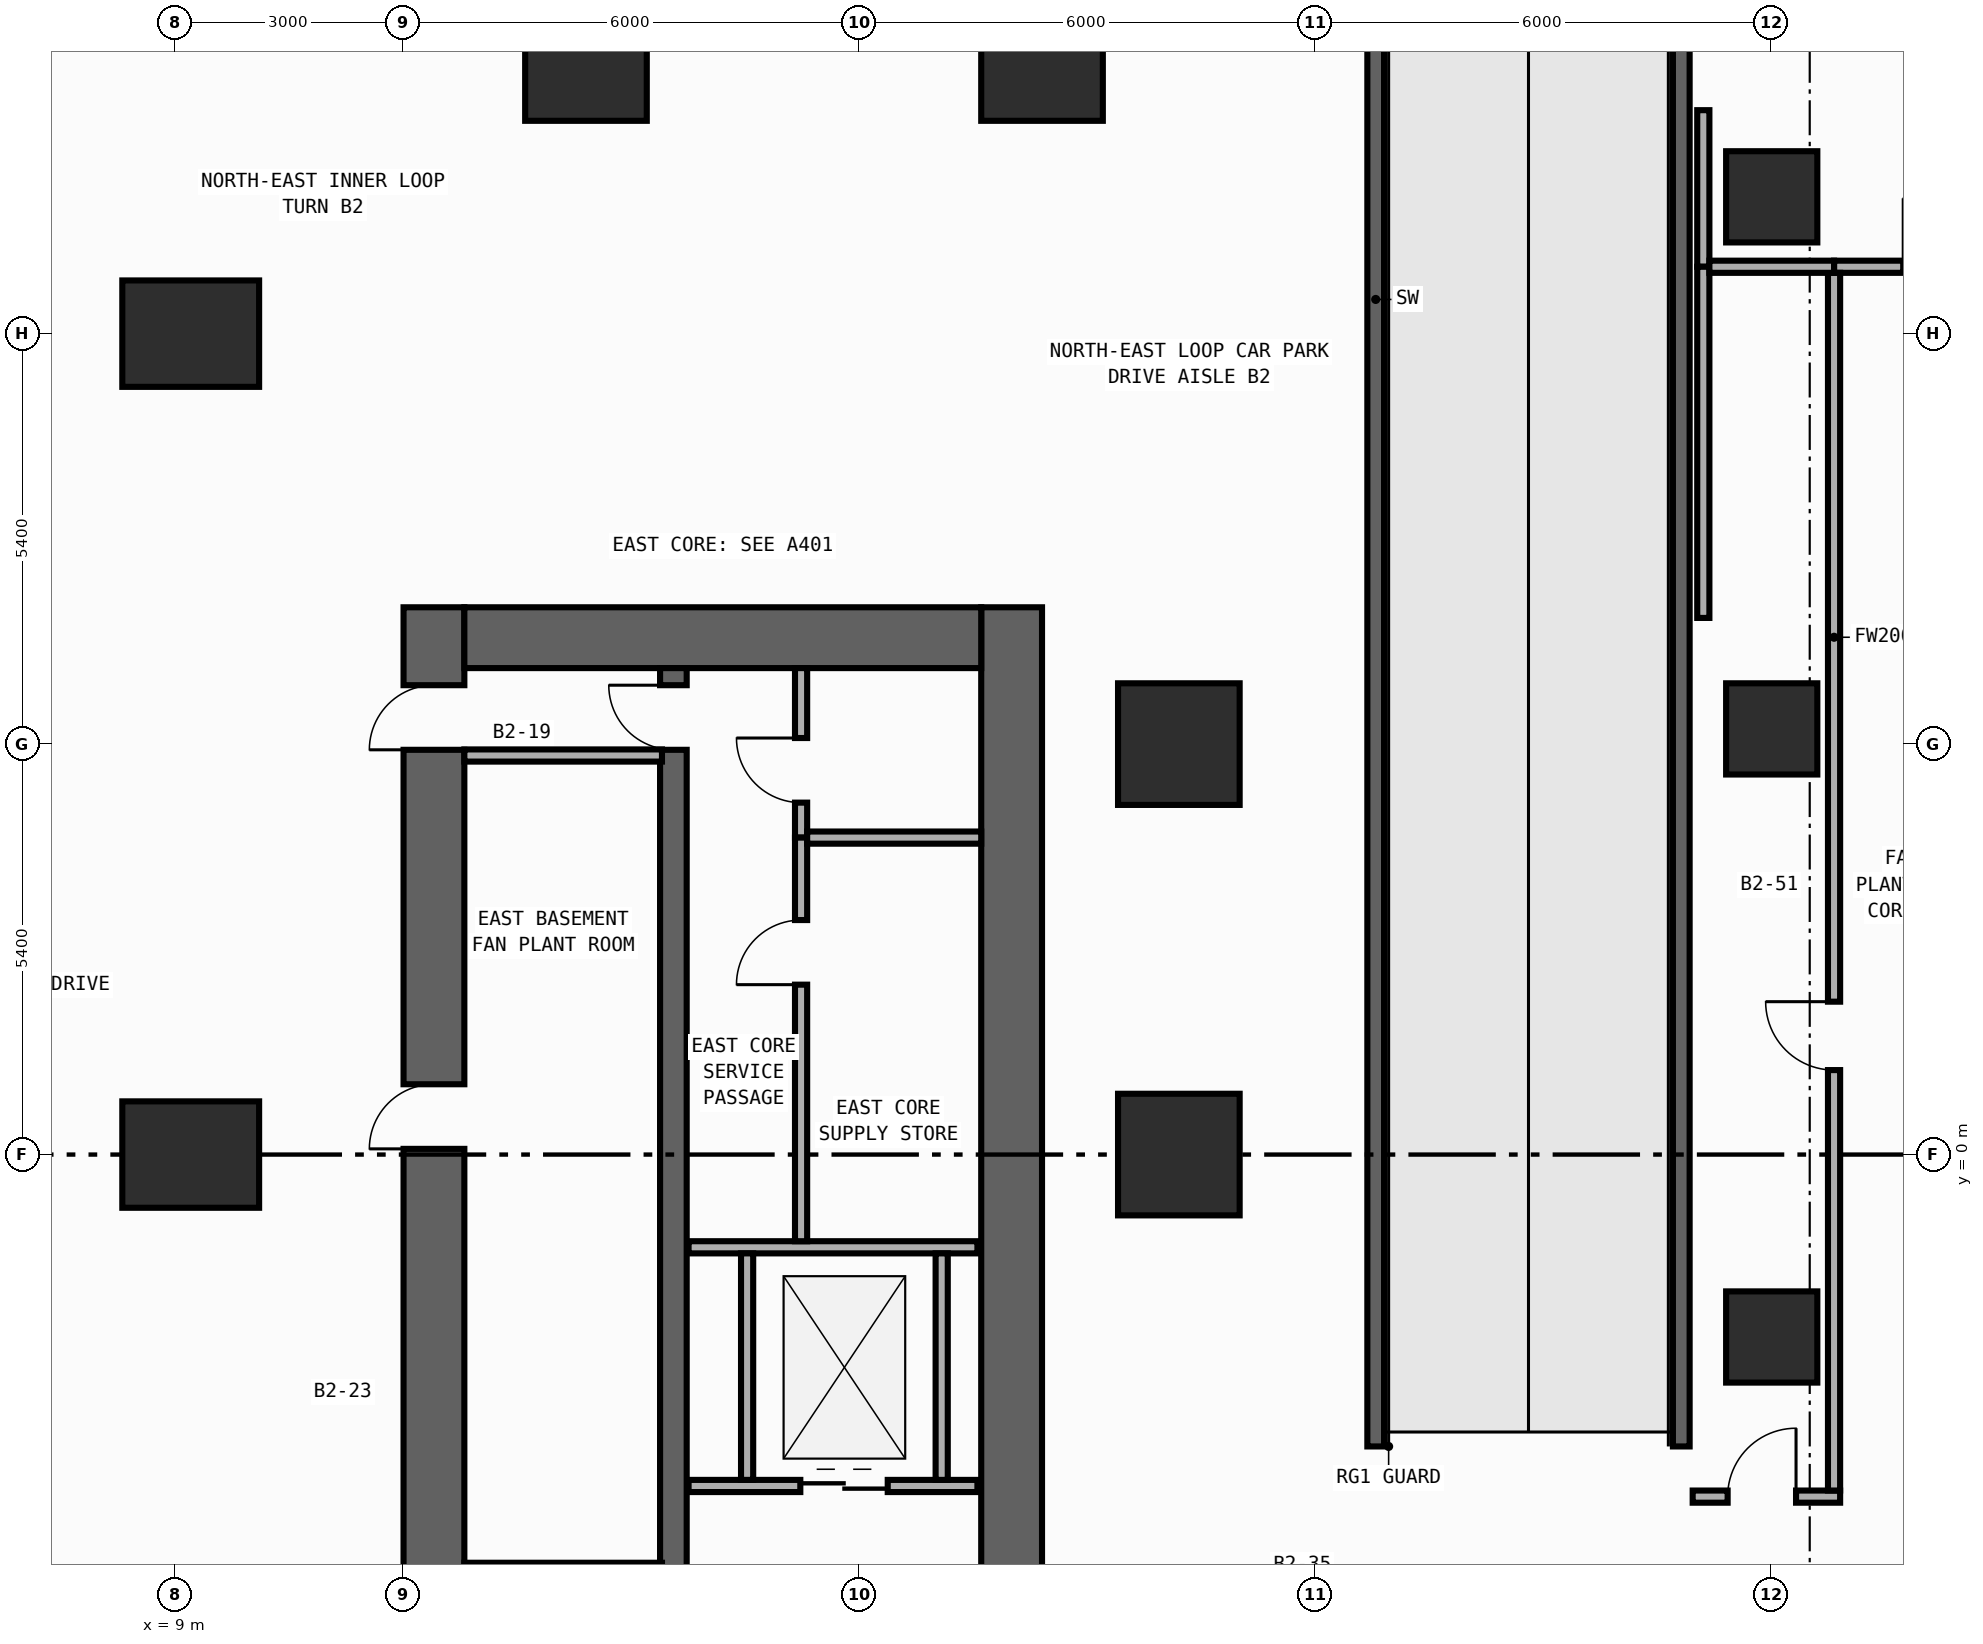
"""IFC4 building model, lengths in metres.
Left out: names, types, materials, properties, quantities, classifications, styles, units other than length and angle.
Written with IfcOpenShell. Run it as: python <this file> out.ifc"""

import sys

from ifc_helpers import new_model, si_unit, direction, frame, frame_2d, origin, origin_2d, place, context, subcontext, project, spatial, polyline, rectangle, outline, extrude, element, fill, save


model = new_model("IFC4")
c1 = context("Model", 3, precision=1e-05, world=origin(), true_north=direction((0.0, 1.0)))
c2 = subcontext(c1, "Body", "Model", "MODEL_VIEW")
j1 = project(units=[si_unit("LENGTHUNIT", "METRE"), si_unit("PLANEANGLEUNIT", "RADIAN")], contexts=[c1])
p1 = place(None, origin())
s1 = spatial("IfcSite", under=j1, at=p1, CompositionType="ELEMENT")
p2 = place(p1, origin())
s2 = spatial("IfcBuilding", under=s1, at=p2, CompositionType="ELEMENT")
p3 = place(p2, frame((0.0, 0.0, -9.0)))
s3 = spatial("IfcBuildingStorey", under=s2, at=p3, CompositionType="ELEMENT", Elevation=-9.0)
p4 = place(p3, frame((12.4, -19.8, 0.0), z_axis=(0.0, 0.0, 1.0), x_axis=(0.0, 1.0, 0.0)))
e1 = element("IfcWall", 1, at=p4, inside=s3, PredefinedType="SHEAR", context=c2, shape_type="SweptSolid", body=[
    extrude(rectangle(XDim=27.0, YDim=0.8, at=frame_2d((13.5, 0.0))), origin(), (0.0, 0.0, 1.0), 4.2),
])
p5 = place(p4, frame((19.875, 0.0, 0.0)))
e2 = element("IfcOpeningElement", 2, at=p5, cuts=e1, PredefinedType="OPENING", context=c2, shape_type="SweptSolid", body=[
    extrude(rectangle(XDim=0.85, YDim=2.1, at=frame_2d((0.425, 1.05))), frame((0.0, 0.41, 0.0), z_axis=(0.0, -1.0, 0.0), x_axis=(1.0, 0.0, 0.0)), (0.0, 0.0, 1.0), 0.82),
])
p6 = place(p4, frame((10.175, 0.0, 0.0)))
e3 = element("IfcOpeningElement", 3, at=p6, cuts=e1, PredefinedType="OPENING", context=c2, shape_type="SweptSolid", body=[
    extrude(rectangle(XDim=0.85, YDim=2.1, at=frame_2d((0.425, 1.05))), frame((0.0, 0.41, 0.0), z_axis=(0.0, -1.0, 0.0), x_axis=(1.0, 0.0, 0.0)), (0.0, 0.0, 1.0), 0.82),
])
p7 = place(p4, frame((12.725, 0.0, 0.0)))
e4 = element("IfcOpeningElement", 4, at=p7, cuts=e1, PredefinedType="OPENING", context=c2, shape_type="SweptSolid", body=[
    extrude(rectangle(XDim=1.15, YDim=2.2, at=frame_2d((0.575, 1.1))), frame((0.0, 0.41, 0.0), z_axis=(0.0, -1.0, 0.0), x_axis=(1.0, 0.0, 0.0)), (0.0, 0.0, 1.0), 0.82),
])
p8 = place(p4, frame((25.125, 0.0, 0.0)))
e5 = element("IfcOpeningElement", 5, at=p8, cuts=e1, PredefinedType="OPENING", context=c2, shape_type="SweptSolid", body=[
    extrude(rectangle(XDim=0.85, YDim=2.1, at=frame_2d((0.425, 1.05))), frame((0.0, 0.41, 0.0), z_axis=(0.0, -1.0, 0.0), x_axis=(1.0, 0.0, 0.0)), (0.0, 0.0, 1.0), 0.82),
])
p9 = place(p3, frame((20.0, -19.8, 0.0), z_axis=(0.0, 0.0, 1.0), x_axis=(0.0, 1.0, 0.0)))
e6 = element("IfcWall", 6, at=p9, inside=s3, PredefinedType="SHEAR", context=c2, shape_type="SweptSolid", body=[
    extrude(rectangle(XDim=27.0, YDim=0.8, at=frame_2d((13.5, 0.0))), origin(), (0.0, 0.0, 1.0), 4.2),
])
p10 = place(p3, frame((12.8, 6.8, 0.0), z_axis=(0.0, 0.0, 1.0), x_axis=(1.0, 0.0, 0.0)))
e7 = element("IfcWall", 7, at=p10, inside=s3, PredefinedType="SHEAR", context=c2, shape_type="SweptSolid", body=[
    extrude(rectangle(XDim=6.8, YDim=0.8, at=frame_2d((3.4, 0.0))), origin(), (0.0, 0.0, 1.0), 4.2),
])
p11 = place(p3, frame((15.55, -19.0, 0.0), z_axis=(0.0, 0.0, 1.0), x_axis=(0.0, 1.0, 0.0)))
e8 = element("IfcWall", 8, at=p11, inside=s3, PredefinedType="SHEAR", context=c2, shape_type="SweptSolid", body=[
    extrude(rectangle(XDim=25.4, YDim=0.35, at=frame_2d((12.7, 0.0))), origin(), (0.0, 0.0, 1.0), 4.2),
])
p12 = place(p11, frame((11.925, 0.0, 0.0)))
e9 = element("IfcOpeningElement", 9, at=p12, cuts=e8, PredefinedType="OPENING", context=c2, shape_type="SweptSolid", body=[
    extrude(rectangle(XDim=1.15, YDim=2.2, at=frame_2d((0.575, 1.1))), frame((0.0, 0.185, 0.0), z_axis=(0.0, -1.0, 0.0), x_axis=(1.0, 0.0, 0.0)), (0.0, 0.0, 1.0), 0.37),
])
p13 = place(p11, frame((24.325, 0.0, 0.0)))
e10 = element("IfcOpeningElement", 10, at=p13, cuts=e8, PredefinedType="OPENING", context=c2, shape_type="SweptSolid", body=[
    extrude(rectangle(XDim=0.85, YDim=2.1, at=frame_2d((0.425, 1.05))), frame((0.0, 0.185, 0.0), z_axis=(0.0, -1.0, 0.0), x_axis=(1.0, 0.0, 0.0)), (0.0, 0.0, 1.0), 0.37),
])
for number, where, z_axis, x_axis in (
    (11, (9.2, 0.0, 0.0), (0.0, 0.0, 1.0), (1.0, 0.0, 0.0)),
    (12, (9.2, 10.8, 0.0), (0.0, 0.0, 1.0), (1.0, 0.0, 0.0)),
):
    element("IfcColumn", number, at=place(p3, frame(where, z_axis=z_axis, x_axis=x_axis)), inside=s3, PredefinedType="COLUMN", context=c2, shape_type="SweptSolid", body=[
        extrude(rectangle(XDim=1.8, YDim=1.4, at=origin_2d()), origin(), (0.0, 0.0, 1.0), 4.5),
    ])
for number, where, z_axis, x_axis in (
    (13, (20.4, 14.4, 0.0), (0.0, 0.0, 1.0), (1.0, 0.0, 0.0)),
    (14, (14.4, 14.4, 0.0), (0.0, 0.0, 1.0), (1.0, 0.0, 0.0)),
):
    element("IfcColumn", number, at=place(p3, frame(where, z_axis=z_axis, x_axis=x_axis)), inside=s3, PredefinedType="COLUMN", context=c2, shape_type="SweptSolid", body=[
        extrude(rectangle(XDim=1.6, YDim=1.6, at=origin_2d()), origin(), (0.0, 0.0, 1.0), 4.5),
    ])
for number, where, z_axis, x_axis in (
    (15, (30.0, -2.4, 0.0), (0.0, 0.0, 1.0), (1.0, 0.0, 0.0)),
    (16, (30.0, 5.6, 0.0), (0.0, 0.0, 1.0), (1.0, 0.0, 0.0)),
    (17, (30.0, 12.6, 0.0), (0.0, 0.0, 1.0), (1.0, 0.0, 0.0)),
):
    element("IfcColumn", number, at=place(p3, frame(where, z_axis=z_axis, x_axis=x_axis)), inside=s3, PredefinedType="COLUMN", context=c2, shape_type="SweptSolid", body=[
        extrude(rectangle(XDim=1.2, YDim=1.2, at=origin_2d()), origin(), (0.0, 0.0, 1.0), 4.5),
    ])
for number, where, z_axis, x_axis in (
    (18, (22.2, 0.0, 0.0), (0.0, 0.0, 1.0), (1.0, 0.0, 0.0)),
    (19, (22.2, 5.4, 0.0), (0.0, 0.0, 1.0), (1.0, 0.0, 0.0)),
):
    element("IfcColumn", number, at=place(p3, frame(where, z_axis=z_axis, x_axis=x_axis)), inside=s3, PredefinedType="COLUMN", context=c2, shape_type="SweptSolid", body=[
        extrude(rectangle(XDim=1.6, YDim=1.6, at=origin_2d()), origin(), (0.0, 0.0, 1.0), 4.5),
    ])
for number, where, z_axis, x_axis in (
    (20, (24.79, -3.84, 0.0), (0.0, 0.0, 1.0), (0.0, 1.0, 0.0)),
    (21, (28.81, -3.84, 0.0), (0.0, 0.0, 1.0), (0.0, 1.0, 0.0)),
):
    element("IfcWall", number, at=place(p3, frame(where, z_axis=z_axis, x_axis=x_axis)), inside=s3, PredefinedType="SHEAR", context=c2, shape_type="SweptSolid", body=[
        extrude(outline(polyline([(0.0, 0.0), (30.18, 0.0), (30.18, 4.2), (0.0, 0.02), (0.0, 0.0)])), frame((0.0, 0.11, 0.0), z_axis=(0.0, -1.0, 0.0), x_axis=(1.0, 0.0, 0.0)), (0.0, 0.0, 1.0), 0.22),
    ])
p14 = place(p3, frame((15.75, -4.36, 0.0), z_axis=(0.0, 0.0, 1.0), x_axis=(1.0, 0.0, 0.0)))
e22 = element("IfcWall", 22, at=p14, inside=s3, PredefinedType="STANDARD", context=c2, shape_type="SweptSolid", body=[
    extrude(rectangle(XDim=3.8, YDim=0.16, at=frame_2d((1.9, 0.0))), origin(), (0.0, 0.0, 1.0), 4.2),
])
p15 = place(p14, frame((1.47, 0.0, 0.0)))
e23 = element("IfcOpeningElement", 23, at=p15, cuts=e22, PredefinedType="OPENING", context=c2, shape_type="SweptSolid", body=[
    extrude(rectangle(XDim=1.15, YDim=2.2, at=frame_2d((0.575, 1.1))), frame((0.0, 0.09, 0.0), z_axis=(0.0, -1.0, 0.0), x_axis=(1.0, 0.0, 0.0)), (0.0, 0.0, 1.0), 0.18),
])
p16 = place(p3, frame((15.75, -1.22, 0.0), z_axis=(0.0, 0.0, 1.0), x_axis=(1.0, 0.0, 0.0)))
e24 = element("IfcWall", 24, at=p16, inside=s3, PredefinedType="STANDARD", context=c2, shape_type="SweptSolid", body=[
    extrude(rectangle(XDim=3.8, YDim=0.16, at=frame_2d((1.9, 0.0))), origin(), (0.0, 0.0, 1.0), 4.2),
])
for number, where, z_axis, x_axis in (
    (25, (16.52, -4.28, 0.0), (0.0, 0.0, 1.0), (0.0, 1.0, 0.0)),
    (26, (19.08, -4.28, 0.0), (0.0, 0.0, 1.0), (0.0, 1.0, 0.0)),
):
    element("IfcWall", number, at=place(p3, frame(where, z_axis=z_axis, x_axis=x_axis)), inside=s3, PredefinedType="STANDARD", context=c2, shape_type="SweptSolid", body=[
        extrude(rectangle(XDim=2.98, YDim=0.16, at=frame_2d((1.49, 0.0))), origin(), (0.0, 0.0, 1.0), 4.2),
    ])
for number, where, z_axis, x_axis in (
    (27, (12.8, -5.45, 0.0), (0.0, 0.0, 1.0), (1.0, 0.0, 0.0)),
    (28, (12.8, 5.25, 0.0), (0.0, 0.0, 1.0), (1.0, 0.0, 0.0)),
):
    element("IfcWall", number, at=place(p3, frame(where, z_axis=z_axis, x_axis=x_axis)), inside=s3, PredefinedType="STANDARD", context=c2, shape_type="SweptSolid", body=[
        extrude(rectangle(XDim=2.6, YDim=0.16, at=frame_2d((1.3, 0.0))), origin(), (0.0, 0.0, 1.0), 4.2),
    ])
p17 = place(p3, frame((17.23, 4.17, 0.0), z_axis=(0.0, 0.0, 1.0), x_axis=(0.0, 1.0, 0.0)))
e29 = element("IfcWall", 29, at=p17, inside=s3, PredefinedType="PARTITIONING", context=c2, shape_type="SweptSolid", body=[
    extrude(rectangle(XDim=2.23, YDim=0.16, at=frame_2d((1.115, 0.0))), origin(), (0.0, 0.0, 1.0), 4.2),
])
p18 = place(p17, frame((0.46, 0.0, 0.0)))
e30 = element("IfcOpeningElement", 30, at=p18, cuts=e29, PredefinedType="OPENING", context=c2, shape_type="SweptSolid", body=[
    extrude(rectangle(XDim=0.85, YDim=2.1, at=frame_2d((0.425, 1.05))), frame((0.0, 0.09, 0.0), z_axis=(0.0, -1.0, 0.0), x_axis=(1.0, 0.0, 0.0)), (0.0, 0.0, 1.0), 0.18),
])
p19 = place(p3, frame((17.23, -1.14, 0.0), z_axis=(0.0, 0.0, 1.0), x_axis=(0.0, 1.0, 0.0)))
e31 = element("IfcWall", 31, at=p19, inside=s3, PredefinedType="PARTITIONING", context=c2, shape_type="SweptSolid", body=[
    extrude(rectangle(XDim=5.31, YDim=0.16, at=frame_2d((2.655, 0.0))), origin(), (0.0, 0.0, 1.0), 4.2),
])
p20 = place(p19, frame((3.375, 0.0, 0.0)))
e32 = element("IfcOpeningElement", 32, at=p20, cuts=e31, PredefinedType="OPENING", context=c2, shape_type="SweptSolid", body=[
    extrude(rectangle(XDim=0.85, YDim=2.1, at=frame_2d((0.425, 1.05))), frame((0.0, 0.09, 0.0), z_axis=(0.0, -1.0, 0.0), x_axis=(1.0, 0.0, 0.0)), (0.0, 0.0, 1.0), 0.18),
])
p21 = place(p3, frame((17.31, 4.17, 0.0), z_axis=(0.0, 0.0, 1.0), x_axis=(1.0, 0.0, 0.0)))
e33 = element("IfcWall", 33, at=p21, inside=s3, PredefinedType="PARTITIONING", context=c2, shape_type="SweptSolid", body=[
    extrude(rectangle(XDim=2.29, YDim=0.16, at=frame_2d((1.145, 0.0))), origin(), (0.0, 0.0, 1.0), 4.2),
])
p22 = place(p3, frame((29.1, 11.68, 0.0), z_axis=(0.0, 0.0, 1.0), x_axis=(0.0, 1.0, 0.0)))
e34 = element("IfcWall", 34, at=p22, inside=s3, PredefinedType="PARTITIONING", context=c2, shape_type="SweptSolid", body=[
    extrude(rectangle(XDim=2.06, YDim=0.16, at=frame_2d((1.03, 0.0))), origin(), (0.0, 0.0, 1.0), 4.2),
])
p23 = place(p3, frame((29.1, 7.06, 0.0), z_axis=(0.0, 0.0, 1.0), x_axis=(0.0, 1.0, 0.0)))
e35 = element("IfcWall", 35, at=p23, inside=s3, PredefinedType="PARTITIONING", context=c2, shape_type="SweptSolid", body=[
    extrude(rectangle(XDim=4.62, YDim=0.16, at=frame_2d((2.31, 0.0))), origin(), (0.0, 0.0, 1.0), 4.2),
])
p24 = place(p3, frame((28.96, -4.5, 0.0), z_axis=(0.0, 0.0, 1.0), x_axis=(1.0, 0.0, 0.0)))
e36 = element("IfcWall", 36, at=p24, inside=s3, PredefinedType="PARTITIONING", context=c2, shape_type="SweptSolid", body=[
    extrude(rectangle(XDim=1.94, YDim=0.16, at=frame_2d((0.97, 0.0))), origin(), (0.0, 0.0, 1.0), 4.2),
])
p25 = place(p24, frame((0.46, 0.0, 0.0)))
e37 = element("IfcOpeningElement", 37, at=p25, cuts=e36, PredefinedType="OPENING", context=c2, shape_type="SweptSolid", body=[
    extrude(rectangle(XDim=0.9, YDim=2.15, at=frame_2d((0.45, 1.075))), frame((0.0, 0.09, 0.0), z_axis=(0.0, -1.0, 0.0), x_axis=(1.0, 0.0, 0.0)), (0.0, 0.0, 1.0), 0.18),
])
p26 = place(p3, frame((30.82, 11.68, 0.0), z_axis=(0.0, 0.0, 1.0), x_axis=(1.0, 0.0, 0.0)))
e38 = element("IfcWall", 38, at=p26, inside=s3, PredefinedType="PARTITIONING", context=c2, shape_type="SweptSolid", body=[
    extrude(rectangle(XDim=2.72, YDim=0.16, at=frame_2d((1.36, 0.0))), origin(), (0.0, 0.0, 1.0), 4.2),
])
p27 = place(p26, frame((0.91, 0.0, 0.0)))
e39 = element("IfcOpeningElement", 39, at=p27, cuts=e38, PredefinedType="OPENING", context=c2, shape_type="SweptSolid", body=[
    extrude(rectangle(XDim=0.9, YDim=2.15, at=frame_2d((0.45, 1.075))), frame((0.0, 0.09, 0.0), z_axis=(0.0, -1.0, 0.0), x_axis=(1.0, 0.0, 0.0)), (0.0, 0.0, 1.0), 0.18),
])
p28 = place(p3, frame((30.82, -4.42, 0.0), z_axis=(0.0, 0.0, 1.0), x_axis=(0.0, 1.0, 0.0)))
e40 = element("IfcWall", 40, at=p28, inside=s3, PredefinedType="PARTITIONING", context=c2, shape_type="SweptSolid", body=[
    extrude(rectangle(XDim=16.02, YDim=0.16, at=frame_2d((8.01, 0.0))), origin(), (0.0, 0.0, 1.0), 4.2),
])
p29 = place(p28, frame((5.531, 0.0, 0.0)))
e41 = element("IfcOpeningElement", 41, at=p29, cuts=e40, PredefinedType="OPENING", context=c2, shape_type="SweptSolid", body=[
    extrude(rectangle(XDim=0.9, YDim=2.15, at=frame_2d((0.45, 1.075))), frame((0.0, 0.09, 0.0), z_axis=(0.0, -1.0, 0.0), x_axis=(1.0, 0.0, 0.0)), (0.0, 0.0, 1.0), 0.18),
])
p30 = place(p3, frame((29.18, 11.68, 0.0), z_axis=(0.0, 0.0, 1.0), x_axis=(1.0, 0.0, 0.0)))
e42 = element("IfcWall", 42, at=p30, inside=s3, PredefinedType="PARTITIONING", context=c2, shape_type="SweptSolid", body=[
    extrude(rectangle(XDim=1.64, YDim=0.16, at=frame_2d((0.82, 0.0))), origin(), (0.0, 0.0, 1.0), 4.2),
])
p31 = place(p5, origin())
e43 = element("IfcDoor", 43, at=p31, inside=s3, OperationType="SINGLE_SWING_LEFT", PredefinedType="DOOR", context=c2, shape_type="SweptSolid", body=[
    extrude(rectangle(XDim=0.85, YDim=2.1, at=frame_2d((0.425, 1.05))), frame((0.0, 0.025, 0.0), z_axis=(0.0, -1.0, 0.0), x_axis=(1.0, 0.0, 0.0)), (0.0, 0.0, 1.0), 0.05),
])
fill(e2, e43)
p32 = place(p8, origin())
e44 = element("IfcDoor", 44, at=p32, inside=s3, OperationType="SINGLE_SWING_LEFT", PredefinedType="DOOR", context=c2, shape_type="SweptSolid", body=[
    extrude(rectangle(XDim=0.85, YDim=2.1, at=frame_2d((0.425, 1.05))), frame((0.0, 0.025, 0.0), z_axis=(0.0, -1.0, 0.0), x_axis=(1.0, 0.0, 0.0)), (0.0, 0.0, 1.0), 0.05),
])
fill(e5, e44)
p33 = place(p13, origin())
e45 = element("IfcDoor", 45, at=p33, inside=s3, OperationType="SINGLE_SWING_RIGHT", PredefinedType="DOOR", context=c2, shape_type="SweptSolid", body=[
    extrude(rectangle(XDim=0.85, YDim=2.1, at=frame_2d((0.425, 1.05))), frame((0.0, 0.025, 0.0), z_axis=(0.0, -1.0, 0.0), x_axis=(1.0, 0.0, 0.0)), (0.0, 0.0, 1.0), 0.05),
])
fill(e10, e45)
p34 = place(p15, origin())
e46 = element("IfcDoor", 46, at=p34, inside=s3, OperationType="DOUBLE_DOOR_SLIDING", PredefinedType="DOOR", context=c2, shape_type="SweptSolid", body=[
    extrude(rectangle(XDim=1.15, YDim=2.2, at=frame_2d((0.575, 1.1))), frame((0.0, 0.025, 0.0), z_axis=(0.0, -1.0, 0.0), x_axis=(1.0, 0.0, 0.0)), (0.0, 0.0, 1.0), 0.05),
])
fill(e23, e46)
p35 = place(p18, origin())
e47 = element("IfcDoor", 47, at=p35, inside=s3, OperationType="SINGLE_SWING_RIGHT", PredefinedType="DOOR", context=c2, shape_type="SweptSolid", body=[
    extrude(rectangle(XDim=0.85, YDim=2.1, at=frame_2d((0.425, 1.05))), frame((0.0, 0.025, 0.0), z_axis=(0.0, -1.0, 0.0), x_axis=(1.0, 0.0, 0.0)), (0.0, 0.0, 1.0), 0.05),
])
fill(e30, e47)
p36 = place(p20, origin())
e48 = element("IfcDoor", 48, at=p36, inside=s3, OperationType="SINGLE_SWING_LEFT", PredefinedType="DOOR", context=c2, shape_type="SweptSolid", body=[
    extrude(rectangle(XDim=0.85, YDim=2.1, at=frame_2d((0.425, 1.05))), frame((0.0, 0.025, 0.0), z_axis=(0.0, -1.0, 0.0), x_axis=(1.0, 0.0, 0.0)), (0.0, 0.0, 1.0), 0.05),
])
fill(e32, e48)
p37 = place(p25, origin())
e49 = element("IfcDoor", 49, at=p37, inside=s3, OperationType="SINGLE_SWING_RIGHT", PredefinedType="DOOR", context=c2, shape_type="SweptSolid", body=[
    extrude(rectangle(XDim=0.9, YDim=2.15, at=frame_2d((0.45, 1.075))), frame((0.0, 0.025, 0.0), z_axis=(0.0, -1.0, 0.0), x_axis=(1.0, 0.0, 0.0)), (0.0, 0.0, 1.0), 0.05),
])
fill(e37, e49)
p38 = place(p27, origin())
e50 = element("IfcDoor", 50, at=p38, inside=s3, OperationType="SINGLE_SWING_LEFT", PredefinedType="DOOR", context=c2, shape_type="SweptSolid", body=[
    extrude(rectangle(XDim=0.9, YDim=2.15, at=frame_2d((0.45, 1.075))), frame((0.0, 0.025, 0.0), z_axis=(0.0, -1.0, 0.0), x_axis=(1.0, 0.0, 0.0)), (0.0, 0.0, 1.0), 0.05),
])
fill(e39, e50)
p39 = place(p29, origin())
e51 = element("IfcDoor", 51, at=p39, inside=s3, OperationType="SINGLE_SWING_RIGHT", PredefinedType="DOOR", context=c2, shape_type="SweptSolid", body=[
    extrude(rectangle(XDim=0.9, YDim=2.15, at=frame_2d((0.45, 1.075))), frame((0.0, 0.025, 0.0), z_axis=(0.0, -1.0, 0.0), x_axis=(1.0, 0.0, 0.0)), (0.0, 0.0, 1.0), 0.05),
])
fill(e41, e51)
save(model, sys.argv[1])
